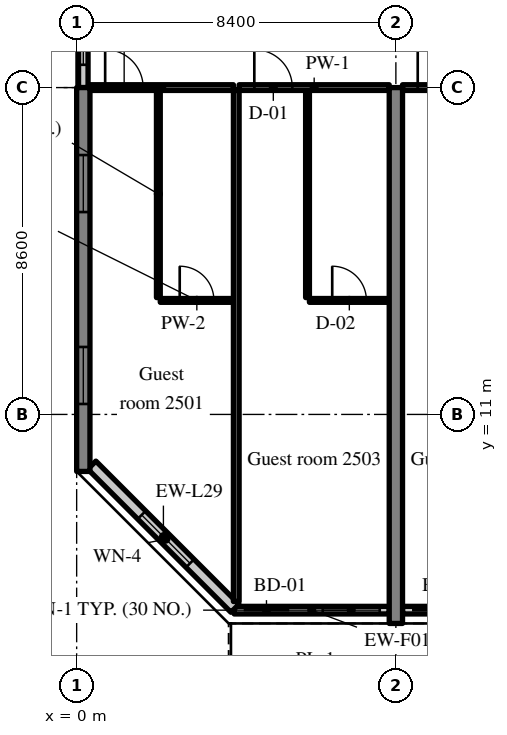
"""IFC4 building model, lengths in metres.
Left out: names, types, materials, properties, quantities, classifications, styles, units other than length and angle.
Written with IfcOpenShell. Run it as: python <this file> out.ifc"""

import sys

from ifc_helpers import new_model, si_unit, direction, frame, frame_2d, origin, place, context, subcontext, project, spatial, rectangle, extrude, source, transform, mapped, element, fill, save


model = new_model("IFC4")
c1 = context("Model", 3, precision=1e-05, world=origin(), true_north=direction((0.0, 1.0)))
c2 = subcontext(c1, "Body", "Model", "MODEL_VIEW")
j1 = project(units=[si_unit("LENGTHUNIT", "METRE"), si_unit("PLANEANGLEUNIT", "RADIAN")], contexts=[c1])
p1 = place(None, origin())
s1 = spatial("IfcSite", under=j1, at=p1, CompositionType="ELEMENT")
p2 = place(p1, origin())
s2 = spatial("IfcBuilding", under=s1, at=p2, CompositionType="ELEMENT")
p3 = place(p2, frame((0.0, 0.0, 106.6)))
s3 = spatial("IfcBuildingStorey", under=s2, at=p3, CompositionType="ELEMENT", Elevation=106.6)
m1 = source(origin(), c2, "Body", "SweptSolid", [
    extrude(rectangle(XDim=10.1, YDim=0.35, at=frame_2d((5.05, 0.0))), origin(), (0.0, 0.0, 1.0), 3.52),
])
p4 = place(p3, frame((0.175, 9.5, 0.0), z_axis=(0.0, 0.0, 1.0), x_axis=(0.0, 1.0, 0.0)))
e1 = element("IfcWall", 1, at=p4, inside=s3, PredefinedType="SHEAR", context=c2, shape_type="MappedRepresentation", body=[
    mapped(m1, transform((0.0, 0.0, 0.0), scale=1.0)),
])
m2 = source(origin(), c2, "Body", "SweptSolid", [
    extrude(rectangle(XDim=1.5, YDim=1.5, at=frame_2d((0.75, 0.75))), frame((0.0, 0.185, 0.0), z_axis=(0.0, -1.0, 0.0), x_axis=(1.0, 0.0, 0.0)), (0.0, 0.0, 1.0), 0.37),
])
p5 = place(p4, frame((1.775, 0.0, 0.9)))
e2 = element("IfcOpeningElement", 2, at=p5, cuts=e1, PredefinedType="OPENING", context=c2, shape_type="MappedRepresentation", body=[
    mapped(m2, transform((0.0, 0.0, 0.0), scale=1.0)),
])
p6 = place(p4, frame((6.825, 0.0, 0.9)))
e3 = element("IfcOpeningElement", 3, at=p6, cuts=e1, PredefinedType="OPENING", context=c2, shape_type="MappedRepresentation", body=[
    mapped(m2, transform((0.0, 0.0, 0.0), scale=1.0)),
])
m3 = source(origin(), c2, "Body", "SweptSolid", [
    extrude(rectangle(XDim=14.1, YDim=0.35, at=frame_2d((7.05, 0.0))), origin(), (0.0, 0.0, 1.0), 3.52),
])
p7 = place(p3, frame((8.4, 5.5, 0.0), z_axis=(0.0, 0.0, 1.0), x_axis=(0.0, 1.0, 0.0)))
e4 = element("IfcWall", 4, at=p7, inside=s3, PredefinedType="SHEAR", context=c2, shape_type="MappedRepresentation", body=[
    mapped(m3, transform((0.0, 0.0, 0.0), scale=1.0)),
])
m4 = source(origin(), c2, "Body", "SweptSolid", [
    extrude(rectangle(XDim=4.08, YDim=0.2, at=frame_2d((2.04, 0.0))), origin(), (0.0, 0.0, 1.0), 2.82),
])
p8 = place(p3, frame((4.145, 5.85, 0.0), z_axis=(0.0, 0.0, 1.0), x_axis=(1.0, 0.0, 0.0)))
e5 = element("IfcWall", 5, at=p8, inside=s3, PredefinedType="SOLIDWALL", context=c2, shape_type="MappedRepresentation", body=[
    mapped(m4, transform((0.0, 0.0, 0.0), scale=1.0)),
])
m5 = source(origin(), c2, "Body", "SweptSolid", [
    extrude(rectangle(XDim=1.2, YDim=2.4, at=frame_2d((0.6, 1.2))), frame((0.0, 0.11, 0.0), z_axis=(0.0, -1.0, 0.0), x_axis=(1.0, 0.0, 0.0)), (0.0, 0.0, 1.0), 0.22),
])
p9 = place(p8, frame((0.25, 0.0, 0.0)))
e6 = element("IfcOpeningElement", 6, at=p9, cuts=e5, PredefinedType="OPENING", context=c2, shape_type="MappedRepresentation", body=[
    mapped(m5, transform((0.0, 0.0, 0.0), scale=1.0)),
])
m6 = source(origin(), c2, "Body", "SweptSolid", [
    extrude(rectangle(XDim=1.5, YDim=1.5, at=frame_2d((0.75, 0.75))), frame((0.0, 0.11, 0.0), z_axis=(0.0, -1.0, 0.0), x_axis=(1.0, 0.0, 0.0)), (0.0, 0.0, 1.0), 0.22),
])
p10 = place(p8, frame((2.33, 0.0, 0.9)))
e7 = element("IfcOpeningElement", 7, at=p10, cuts=e5, PredefinedType="OPENING", context=c2, shape_type="MappedRepresentation", body=[
    mapped(m6, transform((0.0, 0.0, 0.0), scale=1.0)),
])
m7 = source(origin(), c2, "Body", "SweptSolid", [
    extrude(rectangle(XDim=8.05, YDim=0.2, at=frame_2d((4.025, 0.0))), origin(), (0.0, 0.0, 1.0), 2.82),
])
p11 = place(p3, frame((8.575, 5.85, 0.0), z_axis=(0.0, 0.0, 1.0), x_axis=(1.0, 0.0, 0.0)))
e8 = element("IfcWall", 8, at=p11, inside=s3, PredefinedType="SOLIDWALL", context=c2, shape_type="MappedRepresentation", body=[
    mapped(m7, transform((0.0, 0.0, 0.0), scale=1.0)),
])
p12 = place(p11, frame((0.25, 0.0, 0.0)))
e9 = element("IfcOpeningElement", 9, at=p12, cuts=e8, PredefinedType="OPENING", context=c2, shape_type="MappedRepresentation", body=[
    mapped(m5, transform((0.0, 0.0, 0.0), scale=1.0)),
])
p13 = place(p11, frame((2.275, 0.0, 0.9)))
e10 = element("IfcOpeningElement", 10, at=p13, cuts=e8, PredefinedType="OPENING", context=c2, shape_type="MappedRepresentation", body=[
    mapped(m6, transform((0.0, 0.0, 0.0), scale=1.0)),
])
p14 = place(p11, frame((4.275, 0.0, 0.0)))
e11 = element("IfcOpeningElement", 11, at=p14, cuts=e8, PredefinedType="OPENING", context=c2, shape_type="MappedRepresentation", body=[
    mapped(m5, transform((0.0, 0.0, 0.0), scale=1.0)),
])
p15 = place(p11, frame((6.3, 0.0, 0.9)))
e12 = element("IfcOpeningElement", 12, at=p15, cuts=e8, PredefinedType="OPENING", context=c2, shape_type="MappedRepresentation", body=[
    mapped(m6, transform((0.0, 0.0, 0.0), scale=1.0)),
])
m8 = source(origin(), c2, "Body", "SweptSolid", [
    extrude(rectangle(XDim=5.326, YDim=0.3, at=frame_2d((2.663, 0.0))), origin(), (0.0, 0.0, 1.0), 3.52),
])
p16 = place(p3, frame((0.4, 9.666, 0.0), z_axis=(0.0, 0.0, 1.0), x_axis=(0.707106781187, -0.707106781187, 0.0)))
e13 = element("IfcWall", 13, at=p16, inside=s3, PredefinedType="SOLIDWALL", context=c2, shape_type="MappedRepresentation", body=[
    mapped(m8, transform((0.0, 0.0, 0.0), scale=1.0)),
])
m9 = source(origin(), c2, "Body", "SweptSolid", [
    extrude(rectangle(XDim=1.8, YDim=1.5, at=frame_2d((0.9, 0.75))), frame((0.0, 0.16, 0.0), z_axis=(0.0, -1.0, 0.0), x_axis=(1.0, 0.0, 0.0)), (0.0, 0.0, 1.0), 0.32),
])
p17 = place(p16, frame((1.854, 0.0, 0.9)))
e14 = element("IfcOpeningElement", 14, at=p17, cuts=e13, PredefinedType="OPENING", context=c2, shape_type="MappedRepresentation", body=[
    mapped(m9, transform((0.0, 0.0, 0.0), scale=1.0)),
])
m10 = source(origin(), c2, "Body", "SweptSolid", [
    extrude(rectangle(XDim=2.4, YDim=0.25, at=frame_2d((1.2, 0.0))), origin(), (0.0, 0.0, 1.0), 2.62),
])
p18 = place(p3, frame((0.175, 19.6, 0.0), z_axis=(0.0, 0.0, 1.0), x_axis=(0.0, 1.0, 0.0)))
e15 = element("IfcWall", 15, at=p18, inside=s3, PredefinedType="SOLIDWALL", context=c2, shape_type="MappedRepresentation", body=[
    mapped(m10, transform((0.0, 0.0, 0.0), scale=1.0)),
])
m11 = source(origin(), c2, "Body", "SweptSolid", [
    extrude(rectangle(XDim=1.2, YDim=1.5, at=frame_2d((0.6, 0.75))), frame((0.0, 0.135, 0.0), z_axis=(0.0, -1.0, 0.0), x_axis=(1.0, 0.0, 0.0)), (0.0, 0.0, 1.0), 0.27),
])
p19 = place(p18, frame((0.6, 0.0, 0.9)))
e16 = element("IfcOpeningElement", 16, at=p19, cuts=e15, PredefinedType="OPENING", context=c2, shape_type="MappedRepresentation", body=[
    mapped(m11, transform((0.0, 0.0, 0.0), scale=1.0)),
])
m12 = source(origin(), c2, "Body", "SweptSolid", [
    extrude(rectangle(XDim=5.45, YDim=0.1, at=frame_2d((2.725, 0.0))), origin(), (0.0, 0.0, 1.0), 3.52),
])
p20 = place(p3, frame((2.15, 14.075, 0.0), z_axis=(0.0, 0.0, 1.0), x_axis=(0.0, 1.0, 0.0)))
e17 = element("IfcWall", 17, at=p20, inside=s3, PredefinedType="PARTITIONING", context=c2, shape_type="MappedRepresentation", body=[
    mapped(m12, transform((0.0, 0.0, 0.0), scale=1.0)),
])
m13 = source(origin(), c2, "Body", "SweptSolid", [
    extrude(rectangle(XDim=1.925, YDim=0.1, at=frame_2d((0.962, 0.0))), origin(), (0.0, 0.0, 1.0), 3.52),
])
p21 = place(p3, frame((2.2, 14.0, 0.0), z_axis=(0.0, 0.0, 1.0), x_axis=(1.0, 0.0, 0.0)))
e18 = element("IfcWall", 18, at=p21, inside=s3, PredefinedType="PARTITIONING", context=c2, shape_type="MappedRepresentation", body=[
    mapped(m13, transform((0.0, 0.0, 0.0), scale=1.0)),
])
m14 = source(origin(), c2, "Body", "SweptSolid", [
    extrude(rectangle(XDim=0.9, YDim=2.1, at=frame_2d((0.45, 1.05))), frame((0.0, 0.06, 0.0), z_axis=(0.0, -1.0, 0.0), x_axis=(1.0, 0.0, 0.0)), (0.0, 0.0, 1.0), 0.12),
])
p22 = place(p21, frame((0.512, 0.0, 0.0)))
e19 = element("IfcOpeningElement", 19, at=p22, cuts=e18, PredefinedType="OPENING", context=c2, shape_type="MappedRepresentation", body=[
    mapped(m14, transform((0.0, 0.0, 0.0), scale=1.0)),
])
m15 = source(origin(), c2, "Body", "SweptSolid", [
    extrude(rectangle(XDim=3.775, YDim=0.15, at=frame_2d((1.887, 0.0))), origin(), (0.0, 0.0, 1.0), 2.82),
])
p23 = place(p3, frame((0.35, 19.6, 0.0), z_axis=(0.0, 0.0, 1.0), x_axis=(1.0, 0.0, 0.0)))
e20 = element("IfcWall", 20, at=p23, inside=s3, PredefinedType="PARTITIONING", context=c2, shape_type="MappedRepresentation", body=[
    mapped(m15, transform((0.0, 0.0, 0.0), scale=1.0)),
])
m16 = source(origin(), c2, "Body", "SweptSolid", [
    extrude(rectangle(XDim=1.0, YDim=2.1, at=frame_2d((0.5, 1.05))), frame((0.0, 0.085, 0.0), z_axis=(0.0, -1.0, 0.0), x_axis=(1.0, 0.0, 0.0)), (0.0, 0.0, 1.0), 0.17),
])
p24 = place(p23, frame((0.4, 0.0, 0.0)))
e21 = element("IfcOpeningElement", 21, at=p24, cuts=e20, PredefinedType="OPENING", context=c2, shape_type="MappedRepresentation", body=[
    mapped(m16, transform((0.0, 0.0, 0.0), scale=1.0)),
])
p25 = place(p3, frame((6.075, 14.075, 0.0), z_axis=(0.0, 0.0, 1.0), x_axis=(0.0, 1.0, 0.0)))
e22 = element("IfcWall", 22, at=p25, inside=s3, PredefinedType="PARTITIONING", context=c2, shape_type="MappedRepresentation", body=[
    mapped(m12, transform((0.0, 0.0, 0.0), scale=1.0)),
])
m17 = source(origin(), c2, "Body", "SweptSolid", [
    extrude(rectangle(XDim=2.1, YDim=0.1, at=frame_2d((1.05, 0.0))), origin(), (0.0, 0.0, 1.0), 3.52),
])
p26 = place(p3, frame((6.125, 14.0, 0.0), z_axis=(0.0, 0.0, 1.0), x_axis=(1.0, 0.0, 0.0)))
e23 = element("IfcWall", 23, at=p26, inside=s3, PredefinedType="PARTITIONING", context=c2, shape_type="MappedRepresentation", body=[
    mapped(m17, transform((0.0, 0.0, 0.0), scale=1.0)),
])
p27 = place(p26, frame((0.6, 0.0, 0.0)))
e24 = element("IfcOpeningElement", 24, at=p27, cuts=e23, PredefinedType="OPENING", context=c2, shape_type="MappedRepresentation", body=[
    mapped(m14, transform((0.0, 0.0, 0.0), scale=1.0)),
])
m18 = source(origin(), c2, "Body", "SweptSolid", [
    extrude(rectangle(XDim=3.95, YDim=0.15, at=frame_2d((1.975, 0.0))), origin(), (0.0, 0.0, 1.0), 2.82),
])
p28 = place(p3, frame((4.275, 19.6, 0.0), z_axis=(0.0, 0.0, 1.0), x_axis=(1.0, 0.0, 0.0)))
e25 = element("IfcWall", 25, at=p28, inside=s3, PredefinedType="PARTITIONING", context=c2, shape_type="MappedRepresentation", body=[
    mapped(m18, transform((0.0, 0.0, 0.0), scale=1.0)),
])
p29 = place(p28, frame((0.4, 0.0, 0.0)))
e26 = element("IfcOpeningElement", 26, at=p29, cuts=e25, PredefinedType="OPENING", context=c2, shape_type="MappedRepresentation", body=[
    mapped(m16, transform((0.0, 0.0, 0.0), scale=1.0)),
])
m19 = source(origin(), c2, "Body", "SweptSolid", [
    extrude(rectangle(XDim=13.447, YDim=0.15, at=frame_2d((6.724, 0.0))), origin(), (0.0, 0.0, 1.0), 3.52),
])
p30 = place(p3, frame((4.2, 6.078, 0.0), z_axis=(0.0, 0.0, 1.0), x_axis=(0.0, 1.0, 0.0)))
e27 = element("IfcWall", 27, at=p30, inside=s3, PredefinedType="PARTITIONING", context=c2, shape_type="MappedRepresentation", body=[
    mapped(m19, transform((0.0, 0.0, 0.0), scale=1.0)),
])
m20 = source(origin(), c2, "Body", "SweptSolid", [
    extrude(rectangle(XDim=3.95, YDim=0.15, at=frame_2d((1.975, 0.0))), origin(), (0.0, 0.0, 1.0), 2.82),
])
p31 = place(p3, frame((8.575, 19.6, 0.0), z_axis=(0.0, 0.0, 1.0), x_axis=(1.0, 0.0, 0.0)))
e28 = element("IfcWall", 28, at=p31, inside=s3, PredefinedType="PARTITIONING", context=c2, shape_type="MappedRepresentation", body=[
    mapped(m20, transform((0.0, 0.0, 0.0), scale=1.0)),
])
p32 = place(p31, frame((0.4, 0.0, 0.0)))
e29 = element("IfcOpeningElement", 29, at=p32, cuts=e28, PredefinedType="OPENING", context=c2, shape_type="MappedRepresentation", body=[
    mapped(m16, transform((0.0, 0.0, 0.0), scale=1.0)),
])
m21 = source(origin(), c2, "Body", "SweptSolid", [
    extrude(rectangle(XDim=1.2, YDim=2.4, at=frame_2d((0.6, 1.2))), frame((0.0, 0.025, 0.0), z_axis=(0.0, -1.0, 0.0), x_axis=(1.0, 0.0, 0.0)), (0.0, 0.0, 1.0), 0.05),
])
p33 = place(p9, origin())
e30 = element("IfcDoor", 30, at=p33, inside=s3, OperationType="SLIDING_TO_LEFT", PredefinedType="DOOR", context=c2, shape_type="MappedRepresentation", body=[
    mapped(m21, transform((0.0, 0.0, 0.0), scale=1.0)),
])
fill(e6, e30)
m22 = source(origin(), c2, "Body", "SweptSolid", [
    extrude(rectangle(XDim=1.5, YDim=1.5, at=frame_2d((0.75, 0.75))), frame((0.0, 0.03, 0.0), z_axis=(0.0, -1.0, 0.0), x_axis=(1.0, 0.0, 0.0)), (0.0, 0.0, 1.0), 0.06),
])
p34 = place(p10, origin())
e31 = element("IfcWindow", 31, at=p34, inside=s3, PartitioningType="SINGLE_PANEL", PredefinedType="WINDOW", context=c2, shape_type="MappedRepresentation", body=[
    mapped(m22, transform((0.0, 0.0, 0.0), scale=1.0)),
])
fill(e7, e31)
p35 = place(p12, origin())
e32 = element("IfcDoor", 32, at=p35, inside=s3, OperationType="SLIDING_TO_RIGHT", PredefinedType="DOOR", context=c2, shape_type="MappedRepresentation", body=[
    mapped(m21, transform((0.0, 0.0, 0.0), scale=1.0)),
])
fill(e9, e32)
m23 = source(origin(), c2, "Body", "SweptSolid", [
    extrude(rectangle(XDim=1.8, YDim=1.5, at=frame_2d((0.9, 0.75))), frame((0.0, 0.03, 0.0), z_axis=(0.0, -1.0, 0.0), x_axis=(1.0, 0.0, 0.0)), (0.0, 0.0, 1.0), 0.06),
])
p36 = place(p17, origin())
e33 = element("IfcWindow", 33, at=p36, inside=s3, PartitioningType="SINGLE_PANEL", PredefinedType="WINDOW", context=c2, shape_type="MappedRepresentation", body=[
    mapped(m23, transform((0.0, 0.0, 0.0), scale=1.0)),
])
fill(e14, e33)
p37 = place(p5, origin())
e34 = element("IfcWindow", 34, at=p37, inside=s3, PartitioningType="SINGLE_PANEL", PredefinedType="WINDOW", context=c2, shape_type="MappedRepresentation", body=[
    mapped(m22, transform((0.0, 0.0, 0.0), scale=1.0)),
])
fill(e2, e34)
p38 = place(p6, origin())
e35 = element("IfcWindow", 35, at=p38, inside=s3, PartitioningType="SINGLE_PANEL", PredefinedType="WINDOW", context=c2, shape_type="MappedRepresentation", body=[
    mapped(m22, transform((0.0, 0.0, 0.0), scale=1.0)),
])
fill(e3, e35)
m24 = source(origin(), c2, "Body", "SweptSolid", [
    extrude(rectangle(XDim=1.2, YDim=1.5, at=frame_2d((0.6, 0.75))), frame((0.0, 0.03, 0.0), z_axis=(0.0, -1.0, 0.0), x_axis=(1.0, 0.0, 0.0)), (0.0, 0.0, 1.0), 0.06),
])
p39 = place(p19, origin())
e36 = element("IfcWindow", 36, at=p39, inside=s3, PartitioningType="SINGLE_PANEL", PredefinedType="WINDOW", context=c2, shape_type="MappedRepresentation", body=[
    mapped(m24, transform((0.0, 0.0, 0.0), scale=1.0)),
])
fill(e16, e36)
m25 = source(origin(), c2, "Body", "SweptSolid", [
    extrude(rectangle(XDim=0.9, YDim=2.1, at=frame_2d((0.45, 1.05))), frame((0.0, 0.025, 0.0), z_axis=(0.0, -1.0, 0.0), x_axis=(1.0, 0.0, 0.0)), (0.0, 0.0, 1.0), 0.05),
])
p40 = place(p22, origin())
e37 = element("IfcDoor", 37, at=p40, inside=s3, OperationType="SINGLE_SWING_LEFT", PredefinedType="DOOR", context=c2, shape_type="MappedRepresentation", body=[
    mapped(m25, transform((0.0, 0.0, 0.0), scale=1.0)),
])
fill(e19, e37)
m26 = source(origin(), c2, "Body", "SweptSolid", [
    extrude(rectangle(XDim=1.0, YDim=2.1, at=frame_2d((0.5, 1.05))), frame((0.0, 0.025, 0.0), z_axis=(0.0, -1.0, 0.0), x_axis=(1.0, 0.0, 0.0)), (0.0, 0.0, 1.0), 0.05),
])
p41 = place(p24, origin())
e38 = element("IfcDoor", 38, at=p41, inside=s3, OperationType="SINGLE_SWING_LEFT", PredefinedType="DOOR", context=c2, shape_type="MappedRepresentation", body=[
    mapped(m26, transform((0.0, 0.0, 0.0), scale=1.0)),
])
fill(e21, e38)
p42 = place(p27, origin())
e39 = element("IfcDoor", 39, at=p42, inside=s3, OperationType="SINGLE_SWING_LEFT", PredefinedType="DOOR", context=c2, shape_type="MappedRepresentation", body=[
    mapped(m25, transform((0.0, 0.0, 0.0), scale=1.0)),
])
fill(e24, e39)
p43 = place(p29, origin())
e40 = element("IfcDoor", 40, at=p43, inside=s3, OperationType="SINGLE_SWING_LEFT", PredefinedType="DOOR", context=c2, shape_type="MappedRepresentation", body=[
    mapped(m26, transform((0.0, 0.0, 0.0), scale=1.0)),
])
fill(e26, e40)
p44 = place(p32, origin())
e41 = element("IfcDoor", 41, at=p44, inside=s3, OperationType="SINGLE_SWING_LEFT", PredefinedType="DOOR", context=c2, shape_type="MappedRepresentation", body=[
    mapped(m26, transform((0.0, 0.0, 0.0), scale=1.0)),
])
fill(e29, e41)
save(model, sys.argv[1])
